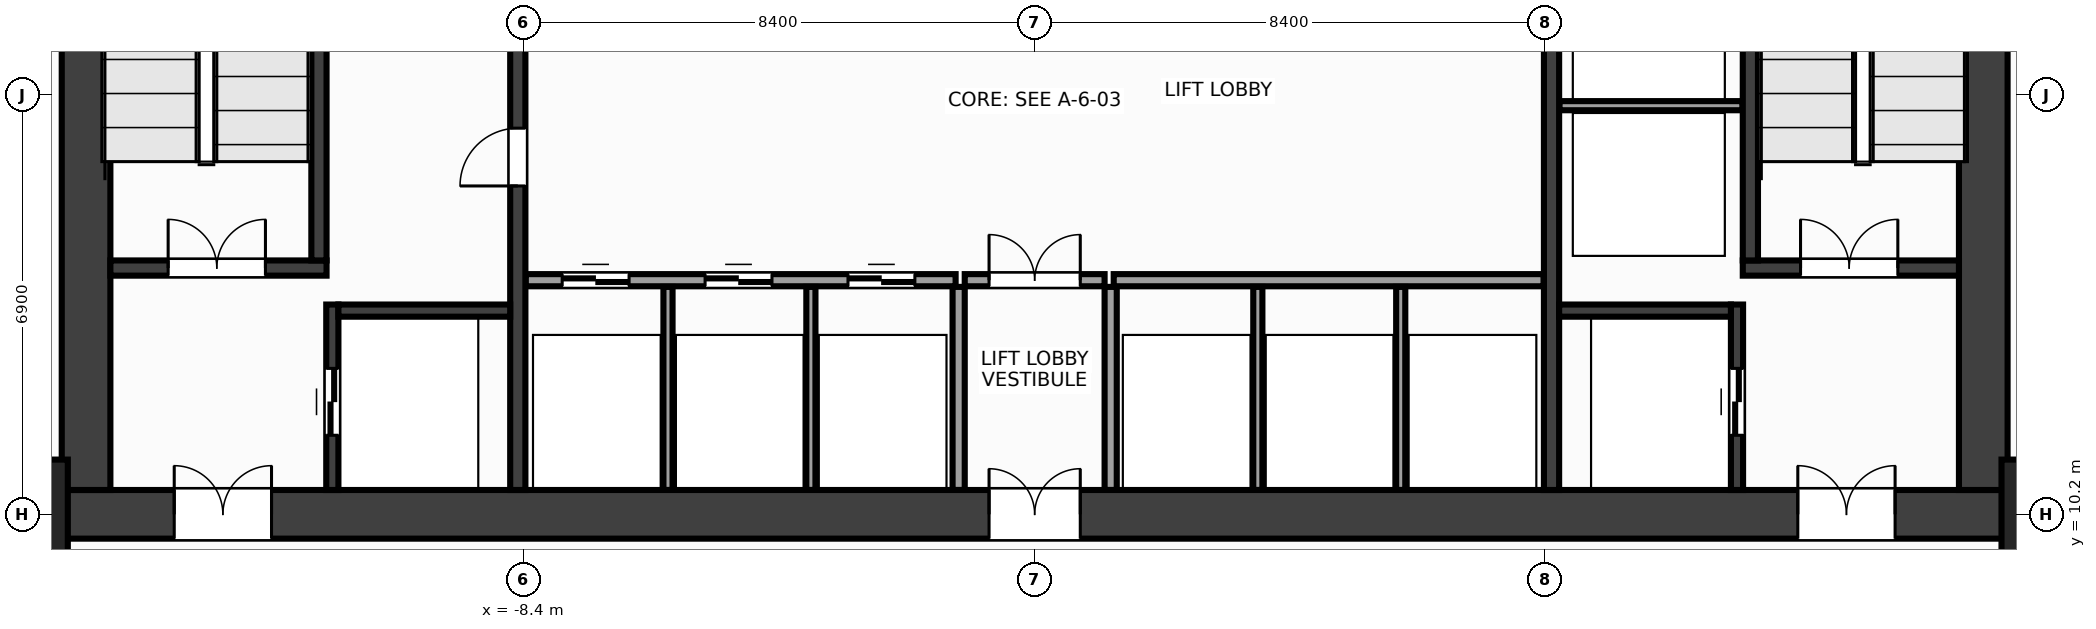
"""IFC4 building model, lengths in metres.
Left out: names, types, materials, properties, quantities, classifications, styles, units other than length and angle.
Written with IfcOpenShell. Run it as: python <this file> out.ifc"""

import sys

from ifc_helpers import new_model, si_unit, direction, frame, frame_2d, origin, origin_2d, place, context, subcontext, project, spatial, rectangle, extrude, source, transform, mapped, element, fill, save


model = new_model("IFC4")
c1 = context("Model", 3, precision=1e-05, world=origin(), true_north=direction((0.0, 1.0)))
c2 = subcontext(c1, "Body", "Model", "MODEL_VIEW")
j1 = project(units=[si_unit("LENGTHUNIT", "METRE"), si_unit("PLANEANGLEUNIT", "RADIAN")], contexts=[c1])
p1 = place(None, origin())
s1 = spatial("IfcSite", under=j1, at=p1, CompositionType="ELEMENT")
p2 = place(p1, origin())
s2 = spatial("IfcBuilding", under=s1, at=p2, CompositionType="ELEMENT")
p3 = place(p2, frame((0.0, 0.0, 38.0)))
s3 = spatial("IfcBuildingStorey", under=s2, at=p3, CompositionType="ELEMENT", Elevation=38.0)
m1 = source(origin(), c2, "Body", "SweptSolid", [
    extrude(rectangle(XDim=32.0, YDim=0.8, at=frame_2d((16.0, 0.0))), origin(), (0.0, 0.0, 1.0), 3.6),
])
p4 = place(p3, frame((-16.0, 10.2, 0.0), z_axis=(0.0, 0.0, 1.0), x_axis=(1.0, 0.0, 0.0)))
e1 = element("IfcWall", 1, at=p4, inside=s3, PredefinedType="SHEAR", context=c2, shape_type="MappedRepresentation", body=[
    mapped(m1, transform((0.0, 0.0, 0.0), x_axis=(1.0, 0.0, 0.0), y_axis=(0.0, 1.0, 0.0), z_axis=(0.0, 0.0, 1.0), scale=1.0)),
])
p5 = place(p4, frame((1.85, 0.0, 0.0)))
e2 = element("IfcOpeningElement", 2, at=p5, cuts=e1, PredefinedType="OPENING", context=c2, shape_type="SweptSolid", body=[
    extrude(rectangle(XDim=1.6, YDim=2.15, at=frame_2d((0.8, 1.075))), frame((0.0, 0.412, 0.0), z_axis=(0.0, -1.0, 0.0), x_axis=(1.0, 0.0, 0.0)), (0.0, 0.0, 1.0), 0.824),
])
p6 = place(p4, frame((28.55, 0.0, 0.0)))
e3 = element("IfcOpeningElement", 3, at=p6, cuts=e1, PredefinedType="OPENING", context=c2, shape_type="SweptSolid", body=[
    extrude(rectangle(XDim=1.6, YDim=2.15, at=frame_2d((0.8, 1.075))), frame((0.0, 0.412, 0.0), z_axis=(0.0, -1.0, 0.0), x_axis=(1.0, 0.0, 0.0)), (0.0, 0.0, 1.0), 0.824),
])
p7 = place(p4, frame((15.25, 0.0, 0.0)))
e4 = element("IfcOpeningElement", 4, at=p7, cuts=e1, PredefinedType="OPENING", context=c2, shape_type="SweptSolid", body=[
    extrude(rectangle(XDim=1.5, YDim=2.2, at=frame_2d((0.75, 1.1))), frame((0.0, 0.412, 0.0), z_axis=(0.0, -1.0, 0.0), x_axis=(1.0, 0.0, 0.0)), (0.0, 0.0, 1.0), 0.824),
])
m2 = source(origin(), c2, "Body", "SweptSolid", [
    extrude(rectangle(XDim=12.8, YDim=0.8, at=frame_2d((6.4, 0.0))), origin(), (0.0, 0.0, 1.0), 3.6),
])
for number, where, z_axis, x_axis in (
    (5, (-15.6, 10.6, 0.0), (0.0, 0.0, 1.0), (0.0, 1.0, 0.0)),
    (6, (15.6, 10.6, 0.0), (0.0, 0.0, 1.0), (0.0, 1.0, 0.0)),
):
    element("IfcWall", number, at=place(p3, frame(where, z_axis=z_axis, x_axis=x_axis)), inside=s3, PredefinedType="SHEAR", context=c2, shape_type="MappedRepresentation", body=[
        mapped(m2, transform((0.0, 0.0, 0.0), x_axis=(1.0, 0.0, 0.0), y_axis=(0.0, 1.0, 0.0), z_axis=(0.0, 0.0, 1.0), scale=1.0)),
    ])
m3 = source(origin(), c2, "Body", "SweptSolid", [
    extrude(rectangle(XDim=12.8, YDim=0.25, at=frame_2d((6.4, 0.0))), origin(), (0.0, 0.0, 1.0), 3.6),
])
p8 = place(p3, frame((-8.5, 10.6, 0.0), z_axis=(0.0, 0.0, 1.0), x_axis=(0.0, 1.0, 0.0)))
e7 = element("IfcWall", 7, at=p8, inside=s3, PredefinedType="SHEAR", context=c2, shape_type="MappedRepresentation", body=[
    mapped(m3, transform((0.0, 0.0, 0.0), x_axis=(1.0, 0.0, 0.0), y_axis=(0.0, 1.0, 0.0), z_axis=(0.0, 0.0, 1.0), scale=1.0)),
])
p9 = place(p8, frame((5.0, 0.0, 0.0)))
e8 = element("IfcOpeningElement", 8, at=p9, cuts=e7, PredefinedType="OPENING", context=c2, shape_type="SweptSolid", body=[
    extrude(rectangle(XDim=0.95, YDim=2.15, at=frame_2d((0.475, 1.075))), frame((0.0, 0.137, 0.0), z_axis=(0.0, -1.0, 0.0), x_axis=(1.0, 0.0, 0.0)), (0.0, 0.0, 1.0), 0.274),
])
p10 = place(p8, frame((8.1, 0.0, 0.0)))
e9 = element("IfcOpeningElement", 9, at=p10, cuts=e7, PredefinedType="OPENING", context=c2, shape_type="SweptSolid", body=[
    extrude(rectangle(XDim=0.95, YDim=2.15, at=frame_2d((0.475, 1.075))), frame((0.0, 0.137, 0.0), z_axis=(0.0, -1.0, 0.0), x_axis=(1.0, 0.0, 0.0)), (0.0, 0.0, 1.0), 0.274),
])
p11 = place(p3, frame((8.5, 10.6, 0.0), z_axis=(0.0, 0.0, 1.0), x_axis=(0.0, 1.0, 0.0)))
e10 = element("IfcWall", 10, at=p11, inside=s3, PredefinedType="SHEAR", context=c2, shape_type="MappedRepresentation", body=[
    mapped(m3, transform((0.0, 0.0, 0.0), x_axis=(1.0, 0.0, 0.0), y_axis=(0.0, 1.0, 0.0), z_axis=(0.0, 0.0, 1.0), scale=1.0)),
])
p12 = place(p11, frame((9.85, 0.0, 0.0)))
e11 = element("IfcOpeningElement", 11, at=p12, cuts=e10, PredefinedType="OPENING", context=c2, shape_type="SweptSolid", body=[
    extrude(rectangle(XDim=0.95, YDim=2.15, at=frame_2d((0.475, 1.075))), frame((0.0, 0.137, 0.0), z_axis=(0.0, -1.0, 0.0), x_axis=(1.0, 0.0, 0.0)), (0.0, 0.0, 1.0), 0.274),
])
m4 = source(origin(), c2, "Body", "SweptSolid", [
    extrude(rectangle(XDim=3.555, YDim=0.25, at=frame_2d((1.777, 0.0))), origin(), (0.0, 0.0, 1.0), 3.6),
])
p13 = place(p3, frame((-15.2, 14.25, 0.0), z_axis=(0.0, 0.0, 1.0), x_axis=(1.0, 0.0, 0.0)))
e12 = element("IfcWall", 12, at=p13, inside=s3, PredefinedType="SHEAR", context=c2, shape_type="MappedRepresentation", body=[
    mapped(m4, transform((0.0, 0.0, 0.0), x_axis=(1.0, 0.0, 0.0), y_axis=(0.0, 1.0, 0.0), z_axis=(0.0, 0.0, 1.0), scale=1.0)),
])
p14 = place(p13, frame((0.95, 0.0, 0.0)))
e13 = element("IfcOpeningElement", 13, at=p14, cuts=e12, PredefinedType="OPENING", context=c2, shape_type="SweptSolid", body=[
    extrude(rectangle(XDim=1.6, YDim=2.15, at=frame_2d((0.8, 1.075))), frame((0.0, 0.137, 0.0), z_axis=(0.0, -1.0, 0.0), x_axis=(1.0, 0.0, 0.0)), (0.0, 0.0, 1.0), 0.274),
])
m5 = source(origin(), c2, "Body", "SweptSolid", [
    extrude(rectangle(XDim=9.025, YDim=0.25, at=frame_2d((4.512, 0.0))), origin(), (0.0, 0.0, 1.0), 3.6),
])
p15 = place(p3, frame((-11.77, 14.375, 0.0), z_axis=(0.0, 0.0, 1.0), x_axis=(0.0, 1.0, 0.0)))
e14 = element("IfcWall", 14, at=p15, inside=s3, PredefinedType="SHEAR", context=c2, shape_type="MappedRepresentation", body=[
    mapped(m5, transform((0.0, 0.0, 0.0), x_axis=(1.0, 0.0, 0.0), y_axis=(0.0, 1.0, 0.0), z_axis=(0.0, 0.0, 1.0), scale=1.0)),
])
p16 = place(p3, frame((11.645, 14.25, 0.0), z_axis=(0.0, 0.0, 1.0), x_axis=(1.0, 0.0, 0.0)))
e15 = element("IfcWall", 15, at=p16, inside=s3, PredefinedType="SHEAR", context=c2, shape_type="MappedRepresentation", body=[
    mapped(m4, transform((0.0, 0.0, 0.0), x_axis=(1.0, 0.0, 0.0), y_axis=(0.0, 1.0, 0.0), z_axis=(0.0, 0.0, 1.0), scale=1.0)),
])
p17 = place(p16, frame((0.95, 0.0, 0.0)))
e16 = element("IfcOpeningElement", 16, at=p17, cuts=e15, PredefinedType="OPENING", context=c2, shape_type="SweptSolid", body=[
    extrude(rectangle(XDim=1.6, YDim=2.15, at=frame_2d((0.8, 1.075))), frame((0.0, 0.137, 0.0), z_axis=(0.0, -1.0, 0.0), x_axis=(1.0, 0.0, 0.0)), (0.0, 0.0, 1.0), 0.274),
])
p18 = place(p3, frame((11.77, 14.375, 0.0), z_axis=(0.0, 0.0, 1.0), x_axis=(0.0, 1.0, 0.0)))
e17 = element("IfcWall", 17, at=p18, inside=s3, PredefinedType="SHEAR", context=c2, shape_type="MappedRepresentation", body=[
    mapped(m5, transform((0.0, 0.0, 0.0), x_axis=(1.0, 0.0, 0.0), y_axis=(0.0, 1.0, 0.0), z_axis=(0.0, 0.0, 1.0), scale=1.0)),
])
m6 = source(origin(), c2, "Body", "SweptSolid", [
    extrude(rectangle(XDim=3.05, YDim=0.2, at=frame_2d((1.525, 0.0))), origin(), (0.0, 0.0, 1.0), 3.6),
])
p19 = place(p3, frame((-11.55, 10.6, 0.0), z_axis=(0.0, 0.0, 1.0), x_axis=(0.0, 1.0, 0.0)))
e18 = element("IfcWall", 18, at=p19, inside=s3, PredefinedType="SHEAR", context=c2, shape_type="MappedRepresentation", body=[
    mapped(m6, transform((0.0, 0.0, 0.0), x_axis=(1.0, 0.0, 0.0), y_axis=(0.0, 1.0, 0.0), z_axis=(0.0, 0.0, 1.0), scale=1.0)),
])
p20 = place(p19, frame((0.9, 0.0, 0.0)))
e19 = element("IfcOpeningElement", 19, at=p20, cuts=e18, PredefinedType="OPENING", context=c2, shape_type="SweptSolid", body=[
    extrude(rectangle(XDim=1.1, YDim=2.15, at=frame_2d((0.55, 1.075))), frame((0.0, 0.112, 0.0), z_axis=(0.0, -1.0, 0.0), x_axis=(1.0, 0.0, 0.0)), (0.0, 0.0, 1.0), 0.224),
])
m7 = source(origin(), c2, "Body", "SweptSolid", [
    extrude(rectangle(XDim=2.825, YDim=0.2, at=frame_2d((1.413, 0.0))), origin(), (0.0, 0.0, 1.0), 3.6),
])
p21 = place(p3, frame((-11.45, 13.55, 0.0), z_axis=(0.0, 0.0, 1.0), x_axis=(1.0, 0.0, 0.0)))
e20 = element("IfcWall", 20, at=p21, inside=s3, PredefinedType="SHEAR", context=c2, shape_type="MappedRepresentation", body=[
    mapped(m7, transform((0.0, 0.0, 0.0), x_axis=(1.0, 0.0, 0.0), y_axis=(0.0, 1.0, 0.0), z_axis=(0.0, 0.0, 1.0), scale=1.0)),
])
p22 = place(p3, frame((11.55, 10.6, 0.0), z_axis=(0.0, 0.0, 1.0), x_axis=(0.0, 1.0, 0.0)))
e21 = element("IfcWall", 21, at=p22, inside=s3, PredefinedType="SHEAR", context=c2, shape_type="MappedRepresentation", body=[
    mapped(m6, transform((0.0, 0.0, 0.0), x_axis=(1.0, 0.0, 0.0), y_axis=(0.0, 1.0, 0.0), z_axis=(0.0, 0.0, 1.0), scale=1.0)),
])
p23 = place(p22, frame((0.9, 0.0, 0.0)))
e22 = element("IfcOpeningElement", 22, at=p23, cuts=e21, PredefinedType="OPENING", context=c2, shape_type="SweptSolid", body=[
    extrude(rectangle(XDim=1.1, YDim=2.15, at=frame_2d((0.55, 1.075))), frame((0.0, 0.112, 0.0), z_axis=(0.0, -1.0, 0.0), x_axis=(1.0, 0.0, 0.0)), (0.0, 0.0, 1.0), 0.224),
])
p24 = place(p3, frame((8.625, 13.55, 0.0), z_axis=(0.0, 0.0, 1.0), x_axis=(1.0, 0.0, 0.0)))
e23 = element("IfcWall", 23, at=p24, inside=s3, PredefinedType="SHEAR", context=c2, shape_type="MappedRepresentation", body=[
    mapped(m7, transform((0.0, 0.0, 0.0), x_axis=(1.0, 0.0, 0.0), y_axis=(0.0, 1.0, 0.0), z_axis=(0.0, 0.0, 1.0), scale=1.0)),
])
m8 = source(origin(), c2, "Body", "SweptSolid", [
    extrude(rectangle(XDim=1.8, YDim=1.8, at=origin_2d()), origin(), (0.0, 0.0, 1.0), 3.6),
])
for number, where, z_axis, x_axis in (
    (24, (-16.8, 10.2, 0.0), (0.0, 0.0, 1.0), (1.0, 0.0, 0.0)),
    (25, (16.8, 10.2, 0.0), (0.0, 0.0, 1.0), (1.0, 0.0, 0.0)),
):
    element("IfcColumn", number, at=place(p3, frame(where, z_axis=z_axis, x_axis=x_axis)), inside=s3, PredefinedType="COLUMN", context=c2, shape_type="MappedRepresentation", body=[
        mapped(m8, transform((0.0, 0.0, 0.0), x_axis=(1.0, 0.0, 0.0), y_axis=(0.0, 1.0, 0.0), z_axis=(0.0, 0.0, 1.0), scale=1.0)),
    ])
m9 = source(origin(), c2, "Body", "SweptSolid", [
    extrude(rectangle(XDim=3.01, YDim=0.15, at=frame_2d((1.505, 0.0))), origin(), (0.0, 0.0, 1.0), 3.36),
])
p25 = place(p3, frame((8.63, 16.92, 0.0), z_axis=(0.0, 0.0, 1.0), x_axis=(1.0, 0.0, 0.0)))
e26 = element("IfcWall", 26, at=p25, inside=s3, PredefinedType="PARTITIONING", context=c2, shape_type="MappedRepresentation", body=[
    mapped(m9, transform((0.0, 0.0, 0.0), x_axis=(1.0, 0.0, 0.0), y_axis=(0.0, 1.0, 0.0), z_axis=(0.0, 0.0, 1.0), scale=1.0)),
])
m10 = source(origin(), c2, "Body", "SweptSolid", [
    extrude(rectangle(XDim=7.07, YDim=0.2, at=frame_2d((3.535, 0.0))), origin(), (0.0, 0.0, 1.0), 3.36),
])
p26 = place(p3, frame((-8.37, 14.05, 0.0), z_axis=(0.0, 0.0, 1.0), x_axis=(1.0, 0.0, 0.0)))
e27 = element("IfcWall", 27, at=p26, inside=s3, PredefinedType="PARTITIONING", context=c2, shape_type="MappedRepresentation", body=[
    mapped(m10, transform((0.0, 0.0, 0.0), x_axis=(1.0, 0.0, 0.0), y_axis=(0.0, 1.0, 0.0), z_axis=(0.0, 0.0, 1.0), scale=1.0)),
])
p27 = place(p26, frame((0.6, 0.0, 0.0)))
e28 = element("IfcOpeningElement", 28, at=p27, cuts=e27, PredefinedType="OPENING", context=c2, shape_type="SweptSolid", body=[
    extrude(rectangle(XDim=1.1, YDim=2.15, at=frame_2d((0.55, 1.075))), frame((0.0, 0.112, 0.0), z_axis=(0.0, -1.0, 0.0), x_axis=(1.0, 0.0, 0.0)), (0.0, 0.0, 1.0), 0.224),
])
p28 = place(p26, frame((2.95, 0.0, 0.0)))
e29 = element("IfcOpeningElement", 29, at=p28, cuts=e27, PredefinedType="OPENING", context=c2, shape_type="SweptSolid", body=[
    extrude(rectangle(XDim=1.1, YDim=2.15, at=frame_2d((0.55, 1.075))), frame((0.0, 0.112, 0.0), z_axis=(0.0, -1.0, 0.0), x_axis=(1.0, 0.0, 0.0)), (0.0, 0.0, 1.0), 0.224),
])
p29 = place(p26, frame((5.3, 0.0, 0.0)))
e30 = element("IfcOpeningElement", 30, at=p29, cuts=e27, PredefinedType="OPENING", context=c2, shape_type="SweptSolid", body=[
    extrude(rectangle(XDim=1.1, YDim=2.15, at=frame_2d((0.55, 1.075))), frame((0.0, 0.112, 0.0), z_axis=(0.0, -1.0, 0.0), x_axis=(1.0, 0.0, 0.0)), (0.0, 0.0, 1.0), 0.224),
])
p30 = place(p3, frame((1.3, 14.05, 0.0), z_axis=(0.0, 0.0, 1.0), x_axis=(1.0, 0.0, 0.0)))
e31 = element("IfcWall", 31, at=p30, inside=s3, PredefinedType="PARTITIONING", context=c2, shape_type="MappedRepresentation", body=[
    mapped(m10, transform((0.0, 0.0, 0.0), x_axis=(1.0, 0.0, 0.0), y_axis=(0.0, 1.0, 0.0), z_axis=(0.0, 0.0, 1.0), scale=1.0)),
])
m11 = source(origin(), c2, "Body", "SweptSolid", [
    extrude(rectangle(XDim=3.34, YDim=0.2, at=frame_2d((1.67, 0.0))), origin(), (0.0, 0.0, 1.0), 3.36),
])
for number, where, z_axis, x_axis in (
    (32, (-1.25, 10.6, 0.0), (0.0, 0.0, 1.0), (0.0, 1.0, 0.0)),
    (33, (1.25, 10.6, 0.0), (0.0, 0.0, 1.0), (0.0, 1.0, 0.0)),
):
    element("IfcWall", number, at=place(p3, frame(where, z_axis=z_axis, x_axis=x_axis)), inside=s3, PredefinedType="PARTITIONING", context=c2, shape_type="MappedRepresentation", body=[
        mapped(m11, transform((0.0, 0.0, 0.0), x_axis=(1.0, 0.0, 0.0), y_axis=(0.0, 1.0, 0.0), z_axis=(0.0, 0.0, 1.0), scale=1.0)),
    ])
m12 = source(origin(), c2, "Body", "SweptSolid", [
    extrude(rectangle(XDim=2.3, YDim=0.2, at=frame_2d((1.15, 0.0))), origin(), (0.0, 0.0, 1.0), 3.36),
])
p31 = place(p3, frame((-1.15, 14.05, 0.0), z_axis=(0.0, 0.0, 1.0), x_axis=(1.0, 0.0, 0.0)))
e34 = element("IfcWall", 34, at=p31, inside=s3, PredefinedType="PARTITIONING", context=c2, shape_type="MappedRepresentation", body=[
    mapped(m12, transform((0.0, 0.0, 0.0), x_axis=(1.0, 0.0, 0.0), y_axis=(0.0, 1.0, 0.0), z_axis=(0.0, 0.0, 1.0), scale=1.0)),
])
p32 = place(p31, frame((0.4, 0.0, 0.0)))
e35 = element("IfcOpeningElement", 35, at=p32, cuts=e34, PredefinedType="OPENING", context=c2, shape_type="SweptSolid", body=[
    extrude(rectangle(XDim=1.5, YDim=2.2, at=frame_2d((0.75, 1.1))), frame((0.0, 0.112, 0.0), z_axis=(0.0, -1.0, 0.0), x_axis=(1.0, 0.0, 0.0)), (0.0, 0.0, 1.0), 0.224),
])
m13 = source(origin(), c2, "Body", "SweptSolid", [
    extrude(rectangle(XDim=3.34, YDim=0.15, at=frame_2d((1.67, 0.0))), origin(), (0.0, 0.0, 1.0), 3.36),
])
for number, where, z_axis, x_axis in (
    (36, (-6.03, 10.6, 0.0), (0.0, 0.0, 1.0), (0.0, 1.0, 0.0)),
    (37, (-3.68, 10.6, 0.0), (0.0, 0.0, 1.0), (0.0, 1.0, 0.0)),
    (38, (3.67, 10.6, 0.0), (0.0, 0.0, 1.0), (0.0, 1.0, 0.0)),
    (39, (6.02, 10.6, 0.0), (0.0, 0.0, 1.0), (0.0, 1.0, 0.0)),
):
    element("IfcWall", number, at=place(p3, frame(where, z_axis=z_axis, x_axis=x_axis)), inside=s3, PredefinedType="PARTITIONING", context=c2, shape_type="MappedRepresentation", body=[
        mapped(m13, transform((0.0, 0.0, 0.0), x_axis=(1.0, 0.0, 0.0), y_axis=(0.0, 1.0, 0.0), z_axis=(0.0, 0.0, 1.0), scale=1.0)),
    ])
m14 = source(origin(), c2, "Body", "SweptSolid", [
    extrude(rectangle(XDim=1.6, YDim=2.15, at=frame_2d((0.8, 1.075))), frame((0.0, 0.025, 0.0), z_axis=(0.0, -1.0, 0.0), x_axis=(1.0, 0.0, 0.0)), (0.0, 0.0, 1.0), 0.05),
])
p33 = place(p14, origin())
e40 = element("IfcDoor", 40, at=p33, inside=s3, OperationType="DOUBLE_DOOR_SINGLE_SWING", PredefinedType="DOOR", context=c2, shape_type="MappedRepresentation", body=[
    mapped(m14, transform((0.0, 0.0, 0.0), x_axis=(1.0, 0.0, 0.0), y_axis=(0.0, 1.0, 0.0), z_axis=(0.0, 0.0, 1.0), scale=1.0)),
])
fill(e13, e40)
p34 = place(p17, origin())
e41 = element("IfcDoor", 41, at=p34, inside=s3, OperationType="DOUBLE_DOOR_SINGLE_SWING", PredefinedType="DOOR", context=c2, shape_type="MappedRepresentation", body=[
    mapped(m14, transform((0.0, 0.0, 0.0), x_axis=(1.0, 0.0, 0.0), y_axis=(0.0, 1.0, 0.0), z_axis=(0.0, 0.0, 1.0), scale=1.0)),
])
fill(e16, e41)
p35 = place(p5, origin())
e42 = element("IfcDoor", 42, at=p35, inside=s3, OperationType="DOUBLE_DOOR_SINGLE_SWING", PredefinedType="DOOR", context=c2, shape_type="MappedRepresentation", body=[
    mapped(m14, transform((0.0, 0.0, 0.0), x_axis=(1.0, 0.0, 0.0), y_axis=(0.0, 1.0, 0.0), z_axis=(0.0, 0.0, 1.0), scale=1.0)),
])
fill(e2, e42)
p36 = place(p6, origin())
e43 = element("IfcDoor", 43, at=p36, inside=s3, OperationType="DOUBLE_DOOR_SINGLE_SWING", PredefinedType="DOOR", context=c2, shape_type="MappedRepresentation", body=[
    mapped(m14, transform((0.0, 0.0, 0.0), x_axis=(1.0, 0.0, 0.0), y_axis=(0.0, 1.0, 0.0), z_axis=(0.0, 0.0, 1.0), scale=1.0)),
])
fill(e3, e43)
m15 = source(origin(), c2, "Body", "SweptSolid", [
    extrude(rectangle(XDim=1.1, YDim=2.15, at=frame_2d((0.55, 1.075))), frame((0.0, 0.025, 0.0), z_axis=(0.0, -1.0, 0.0), x_axis=(1.0, 0.0, 0.0)), (0.0, 0.0, 1.0), 0.05),
])
p37 = place(p20, origin())
e44 = element("IfcDoor", 44, at=p37, inside=s3, OperationType="DOUBLE_DOOR_SLIDING", PredefinedType="DOOR", context=c2, shape_type="MappedRepresentation", body=[
    mapped(m15, transform((0.0, 0.0, 0.0), x_axis=(1.0, 0.0, 0.0), y_axis=(0.0, 1.0, 0.0), z_axis=(0.0, 0.0, 1.0), scale=1.0)),
])
fill(e19, e44)
p38 = place(p23, origin())
e45 = element("IfcDoor", 45, at=p38, inside=s3, OperationType="DOUBLE_DOOR_SLIDING", PredefinedType="DOOR", context=c2, shape_type="MappedRepresentation", body=[
    mapped(m15, transform((0.0, 0.0, 0.0), x_axis=(1.0, 0.0, 0.0), y_axis=(0.0, 1.0, 0.0), z_axis=(0.0, 0.0, 1.0), scale=1.0)),
])
fill(e22, e45)
m16 = source(origin(), c2, "Body", "SweptSolid", [
    extrude(rectangle(XDim=0.95, YDim=2.15, at=frame_2d((0.475, 1.075))), frame((0.0, 0.025, 0.0), z_axis=(0.0, -1.0, 0.0), x_axis=(1.0, 0.0, 0.0)), (0.0, 0.0, 1.0), 0.05),
])
p39 = place(p9, origin())
e46 = element("IfcDoor", 46, at=p39, inside=s3, OperationType="SINGLE_SWING_LEFT", PredefinedType="DOOR", context=c2, shape_type="MappedRepresentation", body=[
    mapped(m16, transform((0.0, 0.0, 0.0), x_axis=(1.0, 0.0, 0.0), y_axis=(0.0, 1.0, 0.0), z_axis=(0.0, 0.0, 1.0), scale=1.0)),
])
fill(e8, e46)
p40 = place(p27, origin())
e47 = element("IfcDoor", 47, at=p40, inside=s3, OperationType="DOUBLE_DOOR_SLIDING", PredefinedType="DOOR", context=c2, shape_type="MappedRepresentation", body=[
    mapped(m15, transform((0.0, 0.0, 0.0), x_axis=(1.0, 0.0, 0.0), y_axis=(0.0, 1.0, 0.0), z_axis=(0.0, 0.0, 1.0), scale=1.0)),
])
fill(e28, e47)
p41 = place(p28, origin())
e48 = element("IfcDoor", 48, at=p41, inside=s3, OperationType="DOUBLE_DOOR_SLIDING", PredefinedType="DOOR", context=c2, shape_type="MappedRepresentation", body=[
    mapped(m15, transform((0.0, 0.0, 0.0), x_axis=(1.0, 0.0, 0.0), y_axis=(0.0, 1.0, 0.0), z_axis=(0.0, 0.0, 1.0), scale=1.0)),
])
fill(e29, e48)
p42 = place(p29, origin())
e49 = element("IfcDoor", 49, at=p42, inside=s3, OperationType="DOUBLE_DOOR_SLIDING", PredefinedType="DOOR", context=c2, shape_type="MappedRepresentation", body=[
    mapped(m15, transform((0.0, 0.0, 0.0), x_axis=(1.0, 0.0, 0.0), y_axis=(0.0, 1.0, 0.0), z_axis=(0.0, 0.0, 1.0), scale=1.0)),
])
fill(e30, e49)
m17 = source(origin(), c2, "Body", "SweptSolid", [
    extrude(rectangle(XDim=1.5, YDim=2.2, at=frame_2d((0.75, 1.1))), frame((0.0, 0.025, 0.0), z_axis=(0.0, -1.0, 0.0), x_axis=(1.0, 0.0, 0.0)), (0.0, 0.0, 1.0), 0.05),
])
p43 = place(p32, origin())
e50 = element("IfcDoor", 50, at=p43, inside=s3, OperationType="DOUBLE_DOOR_SINGLE_SWING", PredefinedType="DOOR", context=c2, shape_type="MappedRepresentation", body=[
    mapped(m17, transform((0.0, 0.0, 0.0), x_axis=(1.0, 0.0, 0.0), y_axis=(0.0, 1.0, 0.0), z_axis=(0.0, 0.0, 1.0), scale=1.0)),
])
fill(e35, e50)
p44 = place(p7, origin())
e51 = element("IfcDoor", 51, at=p44, inside=s3, OperationType="DOUBLE_DOOR_SINGLE_SWING", PredefinedType="DOOR", context=c2, shape_type="MappedRepresentation", body=[
    mapped(m17, transform((0.0, 0.0, 0.0), x_axis=(1.0, 0.0, 0.0), y_axis=(0.0, 1.0, 0.0), z_axis=(0.0, 0.0, 1.0), scale=1.0)),
])
fill(e4, e51)
save(model, sys.argv[1])
